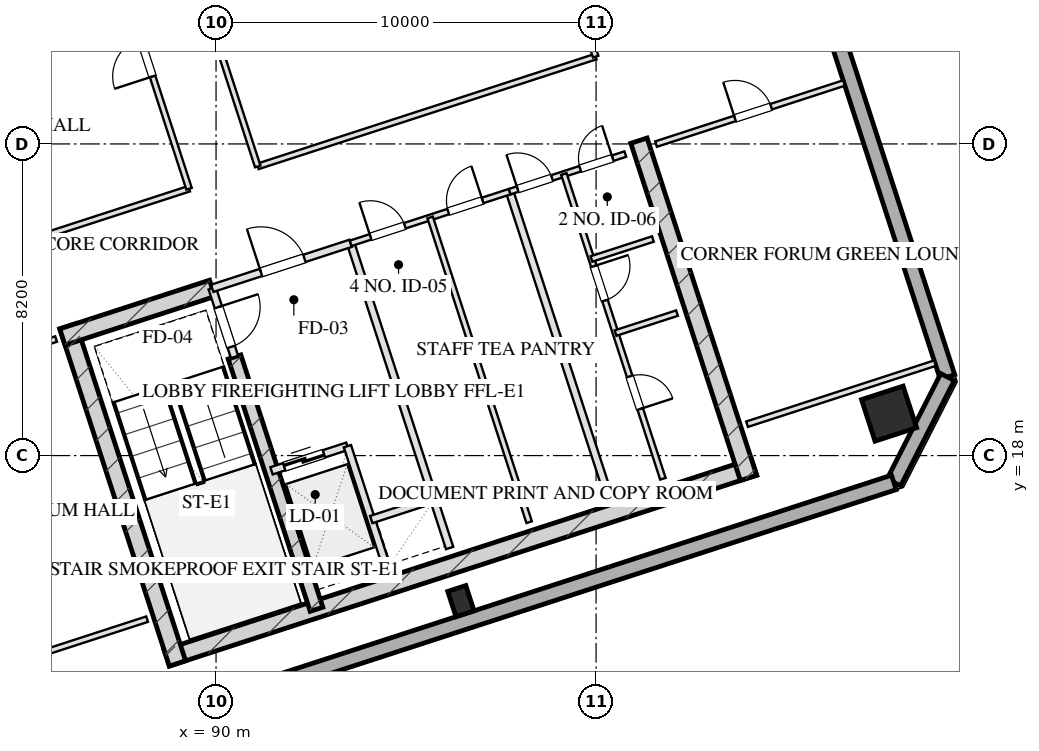
"""IFC4 building model, lengths in metres.
Left out: names, types, materials, properties, quantities, classifications, styles, units other than length and angle.
Written with IfcOpenShell. Run it as: python <this file> out.ifc"""

import sys

from ifc_helpers import new_model, si_unit, direction, frame, frame_2d, origin, origin_2d, place, context, subcontext, project, spatial, rectangle, hollow_rectangle, extrude, element, fill, save


model = new_model("IFC4")
c1 = context("Model", 3, precision=1e-05, world=origin(), true_north=direction((0.0, 1.0)))
c2 = subcontext(c1, "Body", "Model", "MODEL_VIEW")
j1 = project(units=[si_unit("LENGTHUNIT", "METRE"), si_unit("PLANEANGLEUNIT", "RADIAN")], contexts=[c1])
p1 = place(None, origin())
s1 = spatial("IfcSite", under=j1, at=p1, CompositionType="ELEMENT")
p2 = place(p1, origin())
s2 = spatial("IfcBuilding", under=s1, at=p2, CompositionType="ELEMENT")
p3 = place(p2, frame((0.0, 0.0, 198.95)))
s3 = spatial("IfcBuildingStorey", under=s2, at=p3, CompositionType="ELEMENT", Elevation=198.95)
p4 = place(p3, frame((88.701, 12.675, 0.0), z_axis=(0.0, 0.0, 1.0), x_axis=(0.95105824505, 0.309011673763, 0.0)))
e1 = element("IfcWall", 1, at=p4, inside=s3, PredefinedType="SHEAR", context=c2, shape_type="SweptSolid", body=[
    extrude(rectangle(XDim=16.25, YDim=0.45, at=frame_2d((8.125, 0.0))), origin(), (0.0, 0.0, 1.0), 3.45),
])
for number, where, z_axis, x_axis in (
    (2, (86.102, 21.404, 0.0), (0.0, 0.0, 1.0), (0.309, -0.951, 0.0)),
    (3, (101.128, 26.286, 0.0), (0.0, 0.0, 1.0), (0.309, -0.951, 0.0)),
):
    element("IfcWall", number, at=place(p3, frame(where, z_axis=z_axis, x_axis=x_axis)), inside=s3, PredefinedType="SHEAR", context=c2, shape_type="SweptSolid", body=[
        extrude(rectangle(XDim=9.33, YDim=0.45, at=frame_2d((4.665, 0.0))), origin(), (0.0, 0.0, 1.0), 3.45),
    ])
p5 = place(p3, frame((90.486, 20.594, 0.0), z_axis=(0.0, 0.0, 1.0), x_axis=(0.309020428229, -0.951055400562, 0.0)))
e4 = element("IfcWall", 4, at=p5, inside=s3, PredefinedType="SHEAR", context=c2, shape_type="SweptSolid", body=[
    extrude(rectangle(XDim=6.98, YDim=0.35, at=frame_2d((3.49, 0.0))), origin(), (0.0, 0.0, 1.0), 3.45),
])
p6 = place(p3, frame((85.957, 21.12, 0.0), z_axis=(0.0, 0.0, 1.0), x_axis=(0.951064796122, 0.308991510526, 0.0)))
e5 = element("IfcWall", 5, at=p6, inside=s3, PredefinedType="SHEAR", context=c2, shape_type="SweptSolid", body=[
    extrude(rectangle(XDim=4.145, YDim=0.45, at=frame_2d((2.073, 0.0))), origin(), (0.0, 0.0, 1.0), 3.45),
])
p7 = place(p3, frame((107.71, 19.104, 0.0), z_axis=(0.0, 0.0, 1.0), x_axis=(0.951056516295, 0.309016994375, 0.0)))
e6 = element("IfcColumn", 6, at=p7, inside=s3, PredefinedType="COLUMN", context=c2, shape_type="SweptSolid", body=[
    extrude(hollow_rectangle(XDim=1.15, YDim=1.15, WallThickness=0.04, at=origin_2d()), origin(), (0.0, 0.0, 1.0), 3.451),
])
p8 = place(p3, frame((96.443, 14.17, 0.0), z_axis=(0.0, 0.0, 1.0), x_axis=(0.951056516295, 0.309016994375, 0.0)))
e7 = element("IfcColumn", 7, at=p8, inside=s3, PredefinedType="COLUMN", context=c2, shape_type="SweptSolid", body=[
    extrude(hollow_rectangle(XDim=0.5, YDim=0.7, WallThickness=0.025, at=origin_2d()), origin(), (0.0, 0.0, 1.0), 3.451),
])
p9 = place(p3, frame((97.382, 56.586, 0.0), z_axis=(0.0, 0.0, 1.0), x_axis=(0.309016491071, -0.951056679828, 0.0)))
e8 = element("IfcWall", 8, at=p9, inside=s3, PredefinedType="SOLIDWALL", context=c2, shape_type="SweptSolid", body=[
    extrude(rectangle(XDim=38.4, YDim=0.4, at=frame_2d((19.2, 0.0))), origin(), (0.0, 0.0, 1.0), 2.61),
])
p10 = place(p9, frame((24.55, 0.0, 0.75)))
e9 = element("IfcOpeningElement", 9, at=p10, cuts=e8, PredefinedType="OPENING", context=c2, shape_type="SweptSolid", body=[
    extrude(rectangle(XDim=2.1, YDim=1.46, at=frame_2d((1.05, 0.73))), frame((0.0, 0.21, 0.0), z_axis=(0.0, -1.0, 0.0), x_axis=(1.0, 0.0, 0.0)), (0.0, 0.0, 1.0), 0.42),
])
p11 = place(p9, frame((20.75, 0.0, 0.75)))
e10 = element("IfcOpeningElement", 10, at=p11, cuts=e8, PredefinedType="OPENING", context=c2, shape_type="SweptSolid", body=[
    extrude(rectangle(XDim=2.1, YDim=1.46, at=frame_2d((1.05, 0.73))), frame((0.0, 0.21, 0.0), z_axis=(0.0, -1.0, 0.0), x_axis=(1.0, 0.0, 0.0)), (0.0, 0.0, 1.0), 0.42),
])
p12 = place(p9, frame((16.05, 0.0, 0.0)))
e11 = element("IfcOpeningElement", 11, at=p12, cuts=e8, PredefinedType="OPENING", context=c2, shape_type="SweptSolid", body=[
    extrude(rectangle(XDim=1.1, YDim=2.15, at=frame_2d((0.55, 1.075))), frame((0.0, 0.21, 0.0), z_axis=(0.0, -1.0, 0.0), x_axis=(1.0, 0.0, 0.0)), (0.0, 0.0, 1.0), 0.42),
])
p13 = place(p3, frame((109.248, 20.066, 0.0), z_axis=(0.0, 0.0, 1.0), x_axis=(-0.453949291228, -0.891027519774, 0.0)))
e12 = element("IfcWall", 12, at=p13, inside=s3, PredefinedType="SOLIDWALL", context=c2, shape_type="SweptSolid", body=[
    extrude(rectangle(XDim=3.111, YDim=0.4, at=frame_2d((1.556, 0.0))), origin(), (0.0, 0.0, 1.0), 2.61),
])
p14 = place(p3, frame((107.835, 17.294, 0.0), z_axis=(0.0, 0.0, 1.0), x_axis=(-0.951058012937, -0.309012388148, 0.0)))
e13 = element("IfcWall", 13, at=p14, inside=s3, PredefinedType="SOLIDWALL", context=c2, shape_type="SweptSolid", body=[
    extrude(rectangle(XDim=23.6, YDim=0.4, at=frame_2d((11.8, 0.0))), origin(), (0.0, 0.0, 1.0), 2.61),
])
p15 = place(p3, frame((89.899, 22.401, 0.0), z_axis=(0.0, 0.0, 1.0), x_axis=(0.308932062672, -0.951084108086, 0.0)))
e14 = element("IfcWall", 14, at=p15, inside=s3, PredefinedType="PARTITIONING", context=c2, shape_type="SweptSolid", body=[
    extrude(rectangle(XDim=1.9, YDim=0.2, at=frame_2d((0.95, 0.0))), origin(), (0.0, 0.0, 1.0), 3.175),
])
p16 = place(p15, frame((0.52, 0.0, 0.0)))
e15 = element("IfcOpeningElement", 15, at=p16, cuts=e14, PredefinedType="OPENING", context=c2, shape_type="SweptSolid", body=[
    extrude(rectangle(XDim=1.1, YDim=2.05, at=frame_2d((0.55, 1.025))), frame((0.0, 0.11, 0.0), z_axis=(0.0, -1.0, 0.0), x_axis=(1.0, 0.0, 0.0)), (0.0, 0.0, 1.0), 0.22),
])
p17 = place(p3, frame((93.542, 23.585, 0.0), z_axis=(0.0, 0.0, 1.0), x_axis=(0.309042196757, -0.951048327176, 0.0)))
e16 = element("IfcWall", 16, at=p17, inside=s3, PredefinedType="PARTITIONING", context=c2, shape_type="SweptSolid", body=[
    extrude(rectangle(XDim=8.43, YDim=0.2, at=frame_2d((4.215, 0.0))), origin(), (0.0, 0.0, 1.0), 3.175),
])
p18 = place(p3, frame((89.899, 22.401, 0.0), z_axis=(0.0, 0.0, 1.0), x_axis=(0.951046716504, 0.309047153403, 0.0)))
e17 = element("IfcWall", 17, at=p18, inside=s3, PredefinedType="PARTITIONING", context=c2, shape_type="SweptSolid", body=[
    extrude(rectangle(XDim=3.83, YDim=0.2, at=frame_2d((1.915, 0.0))), origin(), (0.0, 0.0, 1.0), 3.175),
])
p19 = place(p18, frame((1.35, 0.0, 0.0)))
e18 = element("IfcOpeningElement", 18, at=p19, cuts=e17, PredefinedType="OPENING", context=c2, shape_type="SweptSolid", body=[
    extrude(rectangle(XDim=1.2, YDim=2.05, at=frame_2d((0.6, 1.025))), frame((0.0, 0.11, 0.0), z_axis=(0.0, -1.0, 0.0), x_axis=(1.0, 0.0, 0.0)), (0.0, 0.0, 1.0), 0.22),
])
p20 = place(p3, frame((91.46, 17.598, 0.0), z_axis=(0.0, 0.0, 1.0), x_axis=(0.951062257173, 0.308999325213, 0.0)))
e19 = element("IfcWall", 19, at=p20, inside=s3, PredefinedType="PARTITIONING", context=c2, shape_type="SweptSolid", body=[
    extrude(rectangle(XDim=2.1, YDim=0.2, at=frame_2d((1.05, 0.0))), origin(), (0.0, 0.0, 1.0), 3.175),
])
p21 = place(p20, frame((0.35, 0.0, 0.0)))
e20 = element("IfcOpeningElement", 20, at=p21, cuts=e19, PredefinedType="OPENING", context=c2, shape_type="SweptSolid", body=[
    extrude(rectangle(XDim=1.1, YDim=2.05, at=frame_2d((0.55, 1.025))), frame((0.0, 0.11, 0.0), z_axis=(0.0, -1.0, 0.0), x_axis=(1.0, 0.0, 0.0)), (0.0, 0.0, 1.0), 0.22),
])
p22 = place(p3, frame((93.457, 18.247, 0.0), z_axis=(0.0, 0.0, 1.0), x_axis=(0.3089935693, -0.951064127245, 0.0)))
e21 = element("IfcWall", 21, at=p22, inside=s3, PredefinedType="PARTITIONING", context=c2, shape_type="SweptSolid", body=[
    extrude(rectangle(XDim=3.7, YDim=0.2, at=frame_2d((1.85, 0.0))), origin(), (0.0, 0.0, 1.0), 3.175),
])
p23 = place(p3, frame((94.084, 16.317, 0.0), z_axis=(0.0, 0.0, 1.0), x_axis=(0.951041328149, 0.309063734775, 0.0)))
e22 = element("IfcWall", 22, at=p23, inside=s3, PredefinedType="PARTITIONING", context=c2, shape_type="SweptSolid", body=[
    extrude(rectangle(XDim=1.73, YDim=0.2, at=frame_2d((0.865, 0.0))), origin(), (0.0, 0.0, 1.0), 3.175),
])
p24 = place(p3, frame((97.727, 24.944, 0.0), z_axis=(0.0, 0.0, 1.0), x_axis=(0.309016001439, -0.951056838919, 0.0)))
e23 = element("IfcWall", 23, at=p24, inside=s3, PredefinedType="PARTITIONING", context=c2, shape_type="SweptSolid", body=[
    extrude(rectangle(XDim=8.43, YDim=0.2, at=frame_2d((4.215, 0.0))), origin(), (0.0, 0.0, 1.0), 3.175),
])
p25 = place(p3, frame((93.542, 23.585, 0.0), z_axis=(0.0, 0.0, 1.0), x_axis=(0.951063829732, 0.308994485023, 0.0)))
e24 = element("IfcWall", 24, at=p25, inside=s3, PredefinedType="PARTITIONING", context=c2, shape_type="SweptSolid", body=[
    extrude(rectangle(XDim=4.4, YDim=0.15, at=frame_2d((2.2, 0.0))), origin(), (0.0, 0.0, 1.0), 3.175),
])
p26 = place(p25, frame((0.55, 0.0, 0.0)))
e25 = element("IfcOpeningElement", 25, at=p26, cuts=e24, PredefinedType="OPENING", context=c2, shape_type="SweptSolid", body=[
    extrude(rectangle(XDim=0.95, YDim=2.05, at=frame_2d((0.475, 1.025))), frame((0.0, 0.085, 0.0), z_axis=(0.0, -1.0, 0.0), x_axis=(1.0, 0.0, 0.0)), (0.0, 0.0, 1.0), 0.17),
])
p27 = place(p25, frame((2.7, 0.0, 0.0)))
e26 = element("IfcOpeningElement", 26, at=p27, cuts=e24, PredefinedType="OPENING", context=c2, shape_type="SweptSolid", body=[
    extrude(rectangle(XDim=0.95, YDim=2.05, at=frame_2d((0.475, 1.025))), frame((0.0, 0.085, 0.0), z_axis=(0.0, -1.0, 0.0), x_axis=(1.0, 0.0, 0.0)), (0.0, 0.0, 1.0), 0.17),
])
p28 = place(p3, frame((95.634, 24.265, 0.0), z_axis=(0.0, 0.0, 1.0), x_axis=(0.309007490203, -0.951059604335, 0.0)))
e27 = element("IfcWall", 27, at=p28, inside=s3, PredefinedType="PARTITIONING", context=c2, shape_type="SweptSolid", body=[
    extrude(rectangle(XDim=8.43, YDim=0.15, at=frame_2d((4.215, 0.0))), origin(), (0.0, 0.0, 1.0), 3.175),
])
p29 = place(p3, frame((97.727, 24.944, 0.0), z_axis=(0.0, 0.0, 1.0), x_axis=(0.951036872128, 0.309077446369, 0.0)))
e28 = element("IfcWall", 28, at=p29, inside=s3, PredefinedType="PARTITIONING", context=c2, shape_type="SweptSolid", body=[
    extrude(rectangle(XDim=3.2, YDim=0.15, at=frame_2d((1.6, 0.0))), origin(), (0.0, 0.0, 1.0), 3.175),
])
p30 = place(p29, frame((0.22, 0.0, 0.0)))
e29 = element("IfcOpeningElement", 29, at=p30, cuts=e28, PredefinedType="OPENING", context=c2, shape_type="SweptSolid", body=[
    extrude(rectangle(XDim=0.95, YDim=2.05, at=frame_2d((0.475, 1.025))), frame((0.0, 0.085, 0.0), z_axis=(0.0, -1.0, 0.0), x_axis=(1.0, 0.0, 0.0)), (0.0, 0.0, 1.0), 0.17),
])
p31 = place(p29, frame((1.95, 0.0, 0.0)))
e30 = element("IfcOpeningElement", 30, at=p31, cuts=e28, PredefinedType="OPENING", context=c2, shape_type="SweptSolid", body=[
    extrude(rectangle(XDim=0.9, YDim=2.05, at=frame_2d((0.45, 1.025))), frame((0.0, 0.085, 0.0), z_axis=(0.0, -1.0, 0.0), x_axis=(1.0, 0.0, 0.0)), (0.0, 0.0, 1.0), 0.17),
])
p32 = place(p3, frame((99.153, 25.408, 0.0), z_axis=(0.0, 0.0, 1.0), x_axis=(0.309016001439, -0.951056838919, 0.0)))
e31 = element("IfcWall", 31, at=p32, inside=s3, PredefinedType="PARTITIONING", context=c2, shape_type="SweptSolid", body=[
    extrude(rectangle(XDim=8.43, YDim=0.15, at=frame_2d((4.215, 0.0))), origin(), (0.0, 0.0, 1.0), 3.175),
])
p33 = place(p32, frame((2.55, 0.0, 0.0)))
e32 = element("IfcOpeningElement", 32, at=p33, cuts=e31, PredefinedType="OPENING", context=c2, shape_type="SweptSolid", body=[
    extrude(rectangle(XDim=0.95, YDim=2.05, at=frame_2d((0.475, 1.025))), frame((0.0, 0.085, 0.0), z_axis=(0.0, -1.0, 0.0), x_axis=(1.0, 0.0, 0.0)), (0.0, 0.0, 1.0), 0.17),
])
p34 = place(p32, frame((5.6, 0.0, 0.0)))
e33 = element("IfcOpeningElement", 33, at=p34, cuts=e31, PredefinedType="OPENING", context=c2, shape_type="SweptSolid", body=[
    extrude(rectangle(XDim=0.9, YDim=2.05, at=frame_2d((0.45, 1.025))), frame((0.0, 0.085, 0.0), z_axis=(0.0, -1.0, 0.0), x_axis=(1.0, 0.0, 0.0)), (0.0, 0.0, 1.0), 0.17),
])
for number, where, z_axis, x_axis in (
    (34, (100.513, 21.223, 0.0), (0.0, 0.0, 1.0), (0.951, 0.309, 0.0)),
    (35, (99.879, 23.173, 0.0), (0.0, 0.0, 1.0), (0.951, 0.309, 0.0)),
):
    element("IfcWall", number, at=place(p3, frame(where, z_axis=z_axis, x_axis=x_axis)), inside=s3, PredefinedType="PARTITIONING", context=c2, shape_type="SweptSolid", body=[
        extrude(rectangle(XDim=1.7, YDim=0.15, at=frame_2d((0.85, 0.0))), origin(), (0.0, 0.0, 1.0), 3.175),
    ])
p35 = place(p3, frame((82.669, 11.903, 0.0), z_axis=(0.0, 0.0, 1.0), x_axis=(0.951059431056, 0.309008023519, 0.0)))
e36 = element("IfcWall", 36, at=p35, inside=s3, PredefinedType="PARTITIONING", context=c2, shape_type="SweptSolid", body=[
    extrude(rectangle(XDim=5.8, YDim=0.15, at=frame_2d((2.9, 0.0))), origin(), (0.0, 0.0, 1.0), 3.175),
])
p36 = place(p3, frame((80.275, 19.274, 0.0), z_axis=(0.0, 0.0, 1.0), x_axis=(0.951059431056, 0.309008023519, 0.0)))
e37 = element("IfcWall", 37, at=p36, inside=s3, PredefinedType="PARTITIONING", context=c2, shape_type="SweptSolid", body=[
    extrude(rectangle(XDim=5.8, YDim=0.15, at=frame_2d((2.9, 0.0))), origin(), (0.0, 0.0, 1.0), 3.175),
])
p37 = place(p36, frame((2.436, 0.0, 0.0)))
e38 = element("IfcOpeningElement", 38, at=p37, cuts=e37, PredefinedType="OPENING", context=c2, shape_type="SweptSolid", body=[
    extrude(rectangle(XDim=1.0, YDim=2.05, at=frame_2d((0.5, 1.025))), frame((0.0, 0.085, 0.0), z_axis=(0.0, -1.0, 0.0), x_axis=(1.0, 0.0, 0.0)), (0.0, 0.0, 1.0), 0.17),
])
p38 = place(p3, frame((103.973, 18.825, 0.0), z_axis=(0.0, 0.0, 1.0), x_axis=(0.951055112834, 0.309021313752, 0.0)))
e39 = element("IfcWall", 39, at=p38, inside=s3, PredefinedType="PARTITIONING", context=c2, shape_type="SweptSolid", body=[
    extrude(rectangle(XDim=5.2, YDim=0.15, at=frame_2d((2.6, 0.0))), origin(), (0.0, 0.0, 1.0), 3.175),
])
p39 = place(p3, frame((101.578, 26.196, 0.0), z_axis=(0.0, 0.0, 1.0), x_axis=(0.951064427824, 0.308992644131, 0.0)))
e40 = element("IfcWall", 40, at=p39, inside=s3, PredefinedType="PARTITIONING", context=c2, shape_type="SweptSolid", body=[
    extrude(rectangle(XDim=5.2, YDim=0.15, at=frame_2d((2.6, 0.0))), origin(), (0.0, 0.0, 1.0), 3.175),
])
p40 = place(p39, frame((2.184, 0.0, 0.0)))
e41 = element("IfcOpeningElement", 41, at=p40, cuts=e40, PredefinedType="OPENING", context=c2, shape_type="SweptSolid", body=[
    extrude(rectangle(XDim=1.0, YDim=2.05, at=frame_2d((0.5, 1.025))), frame((0.0, 0.085, 0.0), z_axis=(0.0, -1.0, 0.0), x_axis=(1.0, 0.0, 0.0)), (0.0, 0.0, 1.0), 0.17),
])
p41 = place(p3, frame((79.447, 21.823, 0.0), z_axis=(0.0, 0.0, 1.0), x_axis=(0.951057294912, 0.309014598029, 0.0)))
e42 = element("IfcWall", 42, at=p41, inside=s3, PredefinedType="PARTITIONING", context=c2, shape_type="SweptSolid", body=[
    extrude(rectangle(XDim=10.35, YDim=0.15, at=frame_2d((5.175, 0.0))), origin(), (0.0, 0.0, 1.0), 3.175),
])
p42 = place(p3, frame((91.097, 25.608, 0.0), z_axis=(0.0, 0.0, 1.0), x_axis=(0.951053063704, 0.309027620156, 0.0)))
e43 = element("IfcWall", 43, at=p42, inside=s3, PredefinedType="PARTITIONING", context=c2, shape_type="SweptSolid", body=[
    extrude(rectangle(XDim=9.35, YDim=0.15, at=frame_2d((4.675, 0.0))), origin(), (0.0, 0.0, 1.0), 3.175),
])
p43 = place(p3, frame((89.29, 25.021, 0.0), z_axis=(0.0, 0.0, 1.0), x_axis=(-0.309004459387, 0.951060589068, 0.0)))
e44 = element("IfcWall", 44, at=p43, inside=s3, PredefinedType="PARTITIONING", context=c2, shape_type="SweptSolid", body=[
    extrude(rectangle(XDim=16.64, YDim=0.15, at=frame_2d((8.32, 0.0))), origin(), (0.0, 0.0, 1.0), 3.175),
])
p44 = place(p43, frame((3.107, 0.0, 0.0)))
e45 = element("IfcOpeningElement", 45, at=p44, cuts=e44, PredefinedType="OPENING", context=c2, shape_type="SweptSolid", body=[
    extrude(rectangle(XDim=1.05, YDim=2.05, at=frame_2d((0.525, 1.025))), frame((0.0, 0.085, 0.0), z_axis=(0.0, -1.0, 0.0), x_axis=(1.0, 0.0, 0.0)), (0.0, 0.0, 1.0), 0.17),
])
p45 = place(p43, frame((11.427, 0.0, 0.0)))
e46 = element("IfcOpeningElement", 46, at=p45, cuts=e44, PredefinedType="OPENING", context=c2, shape_type="SweptSolid", body=[
    extrude(rectangle(XDim=1.0, YDim=2.05, at=frame_2d((0.5, 1.025))), frame((0.0, 0.085, 0.0), z_axis=(0.0, -1.0, 0.0), x_axis=(1.0, 0.0, 0.0)), (0.0, 0.0, 1.0), 0.17),
])
p46 = place(p3, frame((91.097, 25.608, 0.0), z_axis=(0.0, 0.0, 1.0), x_axis=(-0.30901773025, 0.951056277195, 0.0)))
e47 = element("IfcWall", 47, at=p46, inside=s3, PredefinedType="PARTITIONING", context=c2, shape_type="SweptSolid", body=[
    extrude(rectangle(XDim=16.64, YDim=0.15, at=frame_2d((8.32, 0.0))), origin(), (0.0, 0.0, 1.0), 3.175),
])
p47 = place(p46, frame((7.987, 0.0, 0.0)))
e48 = element("IfcOpeningElement", 48, at=p47, cuts=e47, PredefinedType="OPENING", context=c2, shape_type="SweptSolid", body=[
    extrude(rectangle(XDim=1.1, YDim=2.05, at=frame_2d((0.55, 1.025))), frame((0.0, 0.085, 0.0), z_axis=(0.0, -1.0, 0.0), x_axis=(1.0, 0.0, 0.0)), (0.0, 0.0, 1.0), 0.17),
])
p48 = place(p3, frame((99.989, 28.498, 0.0), z_axis=(0.0, 0.0, 1.0), x_axis=(-0.30901773025, 0.951056277195, 0.0)))
e49 = element("IfcWall", 49, at=p48, inside=s3, PredefinedType="PARTITIONING", context=c2, shape_type="SweptSolid", body=[
    extrude(rectangle(XDim=16.64, YDim=0.15, at=frame_2d((8.32, 0.0))), origin(), (0.0, 0.0, 1.0), 3.175),
])
p49 = place(p16, origin())
e50 = element("IfcDoor", 50, at=p49, inside=s3, OperationType="SINGLE_SWING_LEFT", PredefinedType="DOOR", context=c2, shape_type="SweptSolid", body=[
    extrude(rectangle(XDim=1.1, YDim=2.05, at=frame_2d((0.55, 1.025))), frame((0.0, 0.025, 0.0), z_axis=(0.0, -1.0, 0.0), x_axis=(1.0, 0.0, 0.0)), (0.0, 0.0, 1.0), 0.05),
])
fill(e15, e50)
p50 = place(p19, origin())
e51 = element("IfcDoor", 51, at=p50, inside=s3, OperationType="SINGLE_SWING_LEFT", PredefinedType="DOOR", context=c2, shape_type="SweptSolid", body=[
    extrude(rectangle(XDim=1.2, YDim=2.05, at=frame_2d((0.6, 1.025))), frame((0.0, 0.025, 0.0), z_axis=(0.0, -1.0, 0.0), x_axis=(1.0, 0.0, 0.0)), (0.0, 0.0, 1.0), 0.05),
])
fill(e18, e51)
p51 = place(p21, origin())
e52 = element("IfcDoor", 52, at=p51, inside=s3, OperationType="DOUBLE_DOOR_SLIDING", PredefinedType="DOOR", context=c2, shape_type="SweptSolid", body=[
    extrude(rectangle(XDim=1.1, YDim=2.05, at=frame_2d((0.55, 1.025))), frame((0.0, 0.025, 0.0), z_axis=(0.0, -1.0, 0.0), x_axis=(1.0, 0.0, 0.0)), (0.0, 0.0, 1.0), 0.05),
])
fill(e20, e52)
p52 = place(p26, origin())
e53 = element("IfcDoor", 53, at=p52, inside=s3, OperationType="SINGLE_SWING_LEFT", PredefinedType="DOOR", context=c2, shape_type="SweptSolid", body=[
    extrude(rectangle(XDim=0.95, YDim=2.05, at=frame_2d((0.475, 1.025))), frame((0.0, 0.025, 0.0), z_axis=(0.0, -1.0, 0.0), x_axis=(1.0, 0.0, 0.0)), (0.0, 0.0, 1.0), 0.05),
])
fill(e25, e53)
p53 = place(p27, origin())
e54 = element("IfcDoor", 54, at=p53, inside=s3, OperationType="SINGLE_SWING_RIGHT", PredefinedType="DOOR", context=c2, shape_type="SweptSolid", body=[
    extrude(rectangle(XDim=0.95, YDim=2.05, at=frame_2d((0.475, 1.025))), frame((0.0, 0.025, 0.0), z_axis=(0.0, -1.0, 0.0), x_axis=(1.0, 0.0, 0.0)), (0.0, 0.0, 1.0), 0.05),
])
fill(e26, e54)
p54 = place(p30, origin())
e55 = element("IfcDoor", 55, at=p54, inside=s3, OperationType="SINGLE_SWING_LEFT", PredefinedType="DOOR", context=c2, shape_type="SweptSolid", body=[
    extrude(rectangle(XDim=0.95, YDim=2.05, at=frame_2d((0.475, 1.025))), frame((0.0, 0.025, 0.0), z_axis=(0.0, -1.0, 0.0), x_axis=(1.0, 0.0, 0.0)), (0.0, 0.0, 1.0), 0.05),
])
fill(e29, e55)
p55 = place(p31, origin())
e56 = element("IfcDoor", 56, at=p55, inside=s3, OperationType="SINGLE_SWING_RIGHT", PredefinedType="DOOR", context=c2, shape_type="SweptSolid", body=[
    extrude(rectangle(XDim=0.9, YDim=2.05, at=frame_2d((0.45, 1.025))), frame((0.0, 0.025, 0.0), z_axis=(0.0, -1.0, 0.0), x_axis=(1.0, 0.0, 0.0)), (0.0, 0.0, 1.0), 0.05),
])
fill(e30, e56)
p56 = place(p33, origin())
e57 = element("IfcDoor", 57, at=p56, inside=s3, OperationType="SINGLE_SWING_LEFT", PredefinedType="DOOR", context=c2, shape_type="SweptSolid", body=[
    extrude(rectangle(XDim=0.95, YDim=2.05, at=frame_2d((0.475, 1.025))), frame((0.0, 0.025, 0.0), z_axis=(0.0, -1.0, 0.0), x_axis=(1.0, 0.0, 0.0)), (0.0, 0.0, 1.0), 0.05),
])
fill(e32, e57)
p57 = place(p34, origin())
e58 = element("IfcDoor", 58, at=p57, inside=s3, OperationType="SINGLE_SWING_RIGHT", PredefinedType="DOOR", context=c2, shape_type="SweptSolid", body=[
    extrude(rectangle(XDim=0.9, YDim=2.05, at=frame_2d((0.45, 1.025))), frame((0.0, 0.025, 0.0), z_axis=(0.0, -1.0, 0.0), x_axis=(1.0, 0.0, 0.0)), (0.0, 0.0, 1.0), 0.05),
])
fill(e33, e58)
p58 = place(p40, origin())
e59 = element("IfcDoor", 59, at=p58, inside=s3, OperationType="SINGLE_SWING_LEFT", PredefinedType="DOOR", context=c2, shape_type="SweptSolid", body=[
    extrude(rectangle(XDim=1.0, YDim=2.05, at=frame_2d((0.5, 1.025))), frame((0.0, 0.025, 0.0), z_axis=(0.0, -1.0, 0.0), x_axis=(1.0, 0.0, 0.0)), (0.0, 0.0, 1.0), 0.05),
])
fill(e41, e59)
p59 = place(p44, origin())
e60 = element("IfcDoor", 60, at=p59, inside=s3, OperationType="SINGLE_SWING_LEFT", PredefinedType="DOOR", context=c2, shape_type="SweptSolid", body=[
    extrude(rectangle(XDim=1.05, YDim=2.05, at=frame_2d((0.525, 1.025))), frame((0.0, 0.025, 0.0), z_axis=(0.0, -1.0, 0.0), x_axis=(1.0, 0.0, 0.0)), (0.0, 0.0, 1.0), 0.05),
])
fill(e45, e60)
save(model, sys.argv[1])
